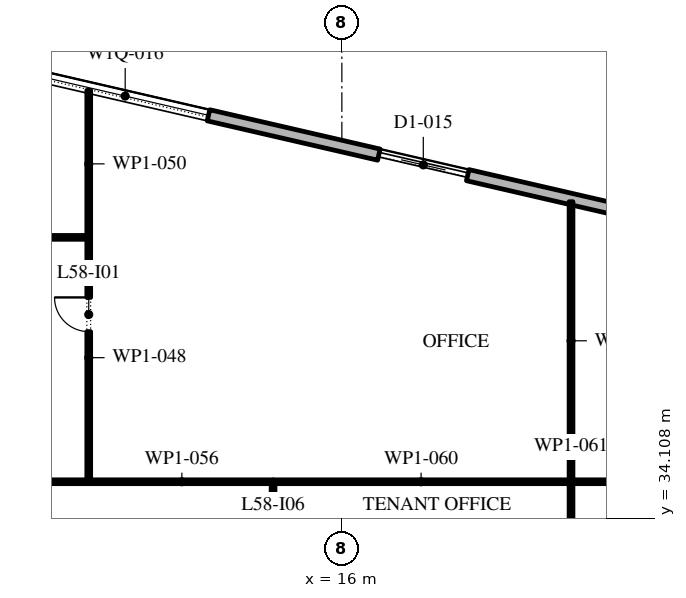
"""IFC4 building model, lengths in metres.
Left out: names, types, materials, properties, quantities, classifications, styles, units other than length and angle.
Written with IfcOpenShell. Run it as: python <this file> out.ifc"""

import sys

from ifc_helpers import new_model, si_unit, direction, frame, frame_2d, origin, place, context, subcontext, project, spatial, rectangle, extrude, element, fill, save


model = new_model("IFC4")
c1 = context("Model", 3, precision=1e-05, world=origin(), true_north=direction((0.0, 1.0)))
c2 = subcontext(c1, "Body", "Model", "MODEL_VIEW")
j1 = project(units=[si_unit("LENGTHUNIT", "METRE"), si_unit("PLANEANGLEUNIT", "RADIAN")], contexts=[c1])
p1 = place(None, origin())
s1 = spatial("IfcSite", under=j1, at=p1, CompositionType="ELEMENT")
p2 = place(p1, origin())
s2 = spatial("IfcBuilding", under=s1, at=p2, CompositionType="ELEMENT")
p3 = place(p2, frame((0.0, 0.0, 268.2)))
s3 = spatial("IfcBuildingStorey", under=s2, at=p3, CompositionType="ELEMENT", Elevation=268.2)
p4 = place(p3, frame((21.359, -11.678, 0.0), z_axis=(0.0, 0.0, 1.0), x_axis=(0.224949198343, 0.974370493275, 0.0)))
e1 = element("IfcWall", 1, at=p4, inside=s3, PredefinedType="STANDARD", context=c2, shape_type="SweptSolid", body=[
    extrude(rectangle(XDim=49.5, YDim=0.3, at=frame_2d((24.75, 0.0))), origin(), (0.0, 0.0, 1.0), 4.0),
])
p5 = place(p4, frame((1.157, 0.0, 0.45)))
e2 = element("IfcOpeningElement", 2, at=p5, cuts=e1, PredefinedType="OPENING", context=c2, shape_type="SweptSolid", body=[
    extrude(rectangle(XDim=4.5, YDim=3.05, at=frame_2d((2.25, 1.525))), frame((0.0, 0.16, 0.0), z_axis=(0.0, -1.0, 0.0), x_axis=(1.0, 0.0, 0.0)), (0.0, 0.0, 1.0), 0.32),
])
p6 = place(p4, frame((8.121, 0.0, 0.45)))
e3 = element("IfcOpeningElement", 3, at=p6, cuts=e1, PredefinedType="OPENING", context=c2, shape_type="SweptSolid", body=[
    extrude(rectangle(XDim=4.5, YDim=3.05, at=frame_2d((2.25, 1.525))), frame((0.0, 0.16, 0.0), z_axis=(0.0, -1.0, 0.0), x_axis=(1.0, 0.0, 0.0)), (0.0, 0.0, 1.0), 0.32),
])
p7 = place(p4, frame((15.236, 0.0, 0.45)))
e4 = element("IfcOpeningElement", 4, at=p7, cuts=e1, PredefinedType="OPENING", context=c2, shape_type="SweptSolid", body=[
    extrude(rectangle(XDim=4.5, YDim=3.05, at=frame_2d((2.25, 1.525))), frame((0.0, 0.16, 0.0), z_axis=(0.0, -1.0, 0.0), x_axis=(1.0, 0.0, 0.0)), (0.0, 0.0, 1.0), 0.32),
])
p8 = place(p4, frame((22.35, 0.0, 0.45)))
e5 = element("IfcOpeningElement", 5, at=p8, cuts=e1, PredefinedType="OPENING", context=c2, shape_type="SweptSolid", body=[
    extrude(rectangle(XDim=4.5, YDim=3.05, at=frame_2d((2.25, 1.525))), frame((0.0, 0.16, 0.0), z_axis=(0.0, -1.0, 0.0), x_axis=(1.0, 0.0, 0.0)), (0.0, 0.0, 1.0), 0.32),
])
p9 = place(p4, frame((29.464, 0.0, 0.45)))
e6 = element("IfcOpeningElement", 6, at=p9, cuts=e1, PredefinedType="OPENING", context=c2, shape_type="SweptSolid", body=[
    extrude(rectangle(XDim=4.5, YDim=2.95, at=frame_2d((2.25, 1.475))), frame((0.0, 0.16, 0.0), z_axis=(0.0, -1.0, 0.0), x_axis=(1.0, 0.0, 0.0)), (0.0, 0.0, 1.0), 0.32),
])
p10 = place(p4, frame((37.628, 0.0, 0.0)))
e7 = element("IfcOpeningElement", 7, at=p10, cuts=e1, PredefinedType="OPENING", context=c2, shape_type="SweptSolid", body=[
    extrude(rectangle(XDim=2.4, YDim=3.325, at=frame_2d((1.2, 1.663))), frame((0.0, 0.16, 0.0), z_axis=(0.0, -1.0, 0.0), x_axis=(1.0, 0.0, 0.0)), (0.0, 0.0, 1.0), 0.32),
])
p11 = place(p4, frame((43.693, 0.0, 0.45)))
e8 = element("IfcOpeningElement", 8, at=p11, cuts=e1, PredefinedType="OPENING", context=c2, shape_type="SweptSolid", body=[
    extrude(rectangle(XDim=4.5, YDim=3.05, at=frame_2d((2.25, 1.525))), frame((0.0, 0.16, 0.0), z_axis=(0.0, -1.0, 0.0), x_axis=(1.0, 0.0, 0.0)), (0.0, 0.0, 1.0), 0.32),
])
p12 = place(p3, frame((29.616, 40.758, 0.0), z_axis=(0.0, 0.0, 1.0), x_axis=(-0.974370532314, 0.224949029246, 0.0)))
e9 = element("IfcWall", 9, at=p12, inside=s3, PredefinedType="STANDARD", context=c2, shape_type="SweptSolid", body=[
    extrude(rectangle(XDim=48.0, YDim=0.3, at=frame_2d((24.0, 0.0))), origin(), (0.0, 0.0, 1.0), 4.0),
])
p13 = place(p12, frame((1.625, 0.0, 0.45)))
e10 = element("IfcOpeningElement", 10, at=p13, cuts=e9, PredefinedType="OPENING", context=c2, shape_type="SweptSolid", body=[
    extrude(rectangle(XDim=4.5, YDim=2.575, at=frame_2d((2.25, 1.288))), frame((0.0, 0.16, 0.0), z_axis=(0.0, -1.0, 0.0), x_axis=(1.0, 0.0, 0.0)), (0.0, 0.0, 1.0), 0.32),
])
p14 = place(p12, frame((10.575, 0.0, 0.0)))
e11 = element("IfcOpeningElement", 11, at=p14, cuts=e9, PredefinedType="OPENING", context=c2, shape_type="SweptSolid", body=[
    extrude(rectangle(XDim=2.4, YDim=3.5, at=frame_2d((1.2, 1.75))), frame((0.0, 0.16, 0.0), z_axis=(0.0, -1.0, 0.0), x_axis=(1.0, 0.0, 0.0)), (0.0, 0.0, 1.0), 0.32),
])
p15 = place(p12, frame((17.575, 0.0, 0.45)))
e12 = element("IfcOpeningElement", 12, at=p15, cuts=e9, PredefinedType="OPENING", context=c2, shape_type="SweptSolid", body=[
    extrude(rectangle(XDim=4.5, YDim=2.45, at=frame_2d((2.25, 1.225))), frame((0.0, 0.16, 0.0), z_axis=(0.0, -1.0, 0.0), x_axis=(1.0, 0.0, 0.0)), (0.0, 0.0, 1.0), 0.32),
])
p16 = place(p12, frame((25.625, 0.0, 0.45)))
e13 = element("IfcOpeningElement", 13, at=p16, cuts=e9, PredefinedType="OPENING", context=c2, shape_type="SweptSolid", body=[
    extrude(rectangle(XDim=4.5, YDim=2.45, at=frame_2d((2.25, 1.225))), frame((0.0, 0.16, 0.0), z_axis=(0.0, -1.0, 0.0), x_axis=(1.0, 0.0, 0.0)), (0.0, 0.0, 1.0), 0.32),
])
p17 = place(p12, frame((33.675, 0.0, 0.45)))
e14 = element("IfcOpeningElement", 14, at=p17, cuts=e9, PredefinedType="OPENING", context=c2, shape_type="SweptSolid", body=[
    extrude(rectangle(XDim=4.5, YDim=2.45, at=frame_2d((2.25, 1.225))), frame((0.0, 0.16, 0.0), z_axis=(0.0, -1.0, 0.0), x_axis=(1.0, 0.0, 0.0)), (0.0, 0.0, 1.0), 0.32),
])
p18 = place(p12, frame((42.175, 0.0, 0.0)))
e15 = element("IfcOpeningElement", 15, at=p18, cuts=e9, PredefinedType="OPENING", context=c2, shape_type="SweptSolid", body=[
    extrude(rectangle(XDim=2.4, YDim=3.5, at=frame_2d((1.2, 1.75))), frame((0.0, 0.16, 0.0), z_axis=(0.0, -1.0, 0.0), x_axis=(1.0, 0.0, 0.0)), (0.0, 0.0, 1.0), 0.32),
])
p19 = place(p3, frame((9.39, 35.07, 0.0), z_axis=(0.0, 0.0, 1.0), x_axis=(-1.0, 0.0, 0.0)))
e16 = element("IfcWall", 16, at=p19, inside=s3, PredefinedType="PARTITIONING", context=c2, shape_type="SweptSolid", body=[
    extrude(rectangle(XDim=8.325, YDim=0.1, at=frame_2d((4.163, 0.0))), origin(), (0.0, 0.0, 1.0), 4.0),
])
p20 = place(p3, frame((9.34, 35.12, 0.0), z_axis=(0.0, 0.0, 1.0), x_axis=(0.0, 1.0, 0.0)))
e17 = element("IfcWall", 17, at=p20, inside=s3, PredefinedType="PARTITIONING", context=c2, shape_type="SweptSolid", body=[
    extrude(rectangle(XDim=6.43, YDim=0.1, at=frame_2d((3.215, 0.0))), origin(), (0.0, 0.0, 1.0), 4.0),
])
p21 = place(p20, frame((3.9, 0.0, 0.0)))
e18 = element("IfcOpeningElement", 18, at=p21, cuts=e17, PredefinedType="OPENING", context=c2, shape_type="SweptSolid", body=[
    extrude(rectangle(XDim=0.9, YDim=2.1, at=frame_2d((0.45, 1.05))), frame((0.0, 0.06, 0.0), z_axis=(0.0, -1.0, 0.0), x_axis=(1.0, 0.0, 0.0)), (0.0, 0.0, 1.0), 0.12),
])
p22 = place(p3, frame((9.29, 41.5, 0.0), z_axis=(0.0, 0.0, 1.0), x_axis=(-1.0, 0.0, 0.0)))
e19 = element("IfcWall", 19, at=p22, inside=s3, PredefinedType="PARTITIONING", context=c2, shape_type="SweptSolid", body=[
    extrude(rectangle(XDim=8.225, YDim=0.1, at=frame_2d((4.113, 0.0))), origin(), (0.0, 0.0, 1.0), 4.0),
])
p23 = place(p3, frame((9.34, 41.5, 0.0), z_axis=(0.0, 0.0, 1.0), x_axis=(0.0, 1.0, 0.0)))
e20 = element("IfcWall", 20, at=p23, inside=s3, PredefinedType="PARTITIONING", context=c2, shape_type="SweptSolid", body=[
    extrude(rectangle(XDim=3.868, YDim=0.1, at=frame_2d((1.934, 0.0))), origin(), (0.0, 0.0, 1.0), 4.0),
])
p24 = place(p3, frame((14.19, 35.07, 0.0), z_axis=(0.0, 0.0, 1.0), x_axis=(-1.0, 0.0, 0.0)))
e21 = element("IfcWall", 21, at=p24, inside=s3, PredefinedType="PARTITIONING", context=c2, shape_type="SweptSolid", body=[
    extrude(rectangle(XDim=4.8, YDim=0.1, at=frame_2d((2.4, 0.0))), origin(), (0.0, 0.0, 1.0), 4.0),
])
p25 = place(p3, frame((14.19, 35.02, 0.0), z_axis=(0.0, 0.0, 1.0), x_axis=(0.0, -1.0, 0.0)))
e22 = element("IfcWall", 22, at=p25, inside=s3, PredefinedType="PARTITIONING", context=c2, shape_type="SweptSolid", body=[
    extrude(rectangle(XDim=4.32, YDim=0.1, at=frame_2d((2.16, 0.0))), origin(), (0.0, 0.0, 1.0), 4.0),
])
p26 = place(p25, frame((1.22, 0.0, 0.0)))
e23 = element("IfcOpeningElement", 23, at=p26, cuts=e22, PredefinedType="OPENING", context=c2, shape_type="SweptSolid", body=[
    extrude(rectangle(XDim=0.9, YDim=2.1, at=frame_2d((0.45, 1.05))), frame((0.0, 0.06, 0.0), z_axis=(0.0, -1.0, 0.0), x_axis=(1.0, 0.0, 0.0)), (0.0, 0.0, 1.0), 0.12),
])
p27 = place(p3, frame((21.98, 35.07, 0.0), z_axis=(0.0, 0.0, 1.0), x_axis=(-1.0, 0.0, 0.0)))
e24 = element("IfcWall", 24, at=p27, inside=s3, PredefinedType="PARTITIONING", context=c2, shape_type="SweptSolid", body=[
    extrude(rectangle(XDim=7.79, YDim=0.1, at=frame_2d((3.895, 0.0))), origin(), (0.0, 0.0, 1.0), 4.0),
])
p28 = place(p3, frame((22.03, 35.02, 0.0), z_axis=(0.0, 0.0, 1.0), x_axis=(0.0, -1.0, 0.0)))
e25 = element("IfcWall", 25, at=p28, inside=s3, PredefinedType="PARTITIONING", context=c2, shape_type="SweptSolid", body=[
    extrude(rectangle(XDim=2.445, YDim=0.1, at=frame_2d((1.223, 0.0))), origin(), (0.0, 0.0, 1.0), 4.0),
])
p29 = place(p3, frame((21.98, 35.07, 0.0), z_axis=(0.0, 0.0, 1.0), x_axis=(1.0, 0.0, 0.0)))
e26 = element("IfcWall", 26, at=p29, inside=s3, PredefinedType="PARTITIONING", context=c2, shape_type="SweptSolid", body=[
    extrude(rectangle(XDim=8.55, YDim=0.1, at=frame_2d((4.275, 0.0))), origin(), (0.0, 0.0, 1.0), 4.0),
])
p30 = place(p29, frame((2.15, 0.0, 0.0)))
e27 = element("IfcOpeningElement", 27, at=p30, cuts=e26, PredefinedType="OPENING", context=c2, shape_type="SweptSolid", body=[
    extrude(rectangle(XDim=0.9, YDim=2.1, at=frame_2d((0.45, 1.05))), frame((0.0, 0.06, 0.0), z_axis=(0.0, -1.0, 0.0), x_axis=(1.0, 0.0, 0.0)), (0.0, 0.0, 1.0), 0.12),
])
p31 = place(p3, frame((22.03, 42.438, 0.0), z_axis=(0.0, 0.0, 1.0), x_axis=(0.0, -1.0, 0.0)))
e28 = element("IfcWall", 28, at=p31, inside=s3, PredefinedType="PARTITIONING", context=c2, shape_type="SweptSolid", body=[
    extrude(rectangle(XDim=7.318, YDim=0.1, at=frame_2d((3.659, 0.0))), origin(), (0.0, 0.0, 1.0), 4.0),
])
p32 = place(p14, origin())
e29 = element("IfcDoor", 29, at=p32, inside=s3, OperationType="DOUBLE_DOOR_SLIDING", PredefinedType="DOOR", context=c2, shape_type="SweptSolid", body=[
    extrude(rectangle(XDim=2.4, YDim=3.5, at=frame_2d((1.2, 1.75))), frame((0.0, 0.025, 0.0), z_axis=(0.0, -1.0, 0.0), x_axis=(1.0, 0.0, 0.0)), (0.0, 0.0, 1.0), 0.05),
])
fill(e11, e29)
p33 = place(p15, origin())
e30 = element("IfcWindow", 30, at=p33, inside=s3, PartitioningType="DOUBLE_PANEL_VERTICAL", PredefinedType="WINDOW", context=c2, shape_type="SweptSolid", body=[
    extrude(rectangle(XDim=4.5, YDim=2.45, at=frame_2d((2.25, 1.225))), frame((0.0, 0.03, 0.0), z_axis=(0.0, -1.0, 0.0), x_axis=(1.0, 0.0, 0.0)), (0.0, 0.0, 1.0), 0.06),
])
fill(e12, e30)
p34 = place(p21, origin())
e31 = element("IfcDoor", 31, at=p34, inside=s3, OperationType="SINGLE_SWING_LEFT", PredefinedType="DOOR", context=c2, shape_type="SweptSolid", body=[
    extrude(rectangle(XDim=0.9, YDim=2.1, at=frame_2d((0.45, 1.05))), frame((0.0, 0.025, 0.0), z_axis=(0.0, -1.0, 0.0), x_axis=(1.0, 0.0, 0.0)), (0.0, 0.0, 1.0), 0.05),
])
fill(e18, e31)
save(model, sys.argv[1])
